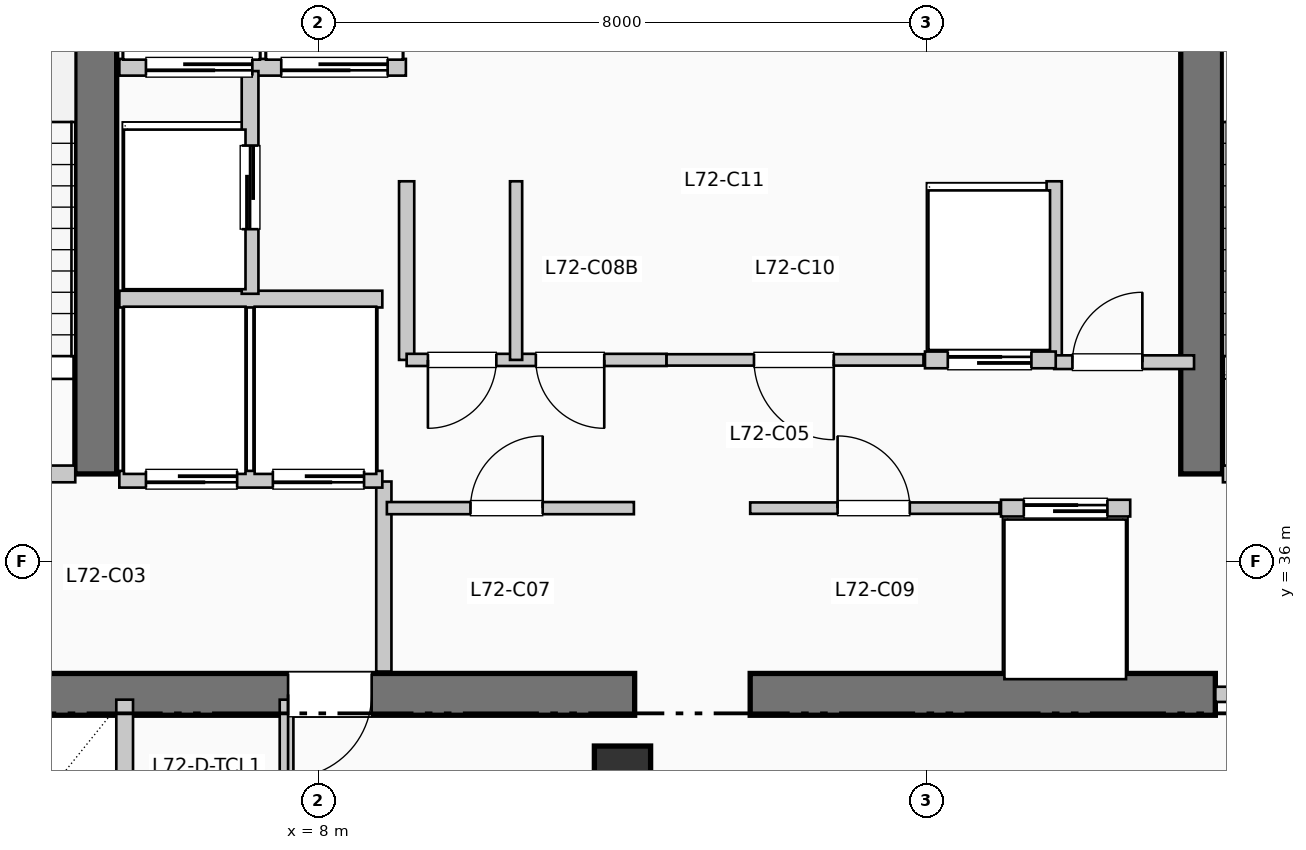
"""IFC4 building model, lengths in metres.
Left out: names, types, materials, properties, quantities, classifications, styles, units other than length and angle.
Written with IfcOpenShell. Run it as: python <this file> out.ifc"""

import sys

from ifc_helpers import new_model, si_unit, direction, frame, frame_2d, origin, origin_2d, place, context, subcontext, project, spatial, rectangle, extrude, element, fill, save


model = new_model("IFC4")
c1 = context("Model", 3, precision=1e-05, world=origin(), true_north=direction((0.0, 1.0)))
c2 = subcontext(c1, "Body", "Model", "MODEL_VIEW")
j1 = project(units=[si_unit("LENGTHUNIT", "METRE"), si_unit("PLANEANGLEUNIT", "RADIAN")], contexts=[c1])
p1 = place(None, origin())
s1 = spatial("IfcSite", under=j1, at=p1, CompositionType="ELEMENT")
p2 = place(p1, origin())
s2 = spatial("IfcBuilding", under=s1, at=p2, CompositionType="ELEMENT")
p3 = place(p2, frame((0.0, 0.0, 296.01)))
s3 = spatial("IfcBuildingStorey", under=s2, at=p3, CompositionType="ELEMENT", Elevation=296.01)
p4 = place(p3, frame((1.45, 34.25, 0.0), z_axis=(0.0, 0.0, 1.0), x_axis=(1.0, 0.0, 0.0)))
e1 = element("IfcWall", 1, at=p4, inside=s3, PredefinedType="SHEAR", context=c2, shape_type="SweptSolid", body=[
    extrude(rectangle(XDim=10.71, YDim=0.55, at=frame_2d((5.355, 0.0))), origin(), (0.0, 0.0, 1.0), 3.96),
])
p5 = place(p4, frame((7.25, 0.0, 0.0), z_axis=(0.0, 0.0, 1.0), x_axis=(-1.0, 0.0, 0.0)))
e2 = element("IfcOpeningElement", 2, at=p5, cuts=e1, PredefinedType="OPENING", context=c2, shape_type="SweptSolid", body=[
    extrude(rectangle(XDim=1.1, YDim=2.15, at=frame_2d((0.55, 1.075))), frame((0.0, 0.285, 0.0), z_axis=(0.0, -1.0, 0.0), x_axis=(1.0, 0.0, 0.0)), (0.0, 0.0, 1.0), 0.57),
])
p6 = place(p3, frame((13.68, 34.25, 0.0), z_axis=(0.0, 0.0, 1.0), x_axis=(1.0, 0.0, 0.0)))
e3 = element("IfcWall", 3, at=p6, inside=s3, PredefinedType="SHEAR", context=c2, shape_type="SweptSolid", body=[
    extrude(rectangle(XDim=6.12, YDim=0.55, at=frame_2d((3.06, 0.0))), origin(), (0.0, 0.0, 1.0), 3.96),
])
for number, where, z_axis, x_axis in (
    (4, (5.07, 37.15, 0.0), (0.0, 0.0, 1.0), (0.0, 1.0, 0.0)),
    (5, (19.62, 37.15, 0.0), (0.0, 0.0, 1.0), (0.0, 1.0, 0.0)),
):
    element("IfcWall", number, at=place(p3, frame(where, z_axis=z_axis, x_axis=x_axis)), inside=s3, PredefinedType="SHEAR", context=c2, shape_type="SweptSolid", body=[
        extrude(rectangle(XDim=7.89, YDim=0.55, at=frame_2d((3.945, 0.0))), origin(), (0.0, 0.0, 1.0), 3.96),
    ])
p7 = place(p3, frame((12.0, 33.2, 0.0), z_axis=(0.0, 0.0, 1.0), x_axis=(1.0, 0.0, 0.0)))
e6 = element("IfcColumn", 6, at=p7, inside=s3, PredefinedType="COLUMN", context=c2, shape_type="SweptSolid", body=[
    extrude(rectangle(XDim=0.74, YDim=0.74, at=origin_2d()), origin(), (0.0, 0.0, 1.0), 3.96),
])
p8 = place(p3, frame((1.65, 37.15, 0.0), z_axis=(0.0, 0.0, 1.0), x_axis=(1.0, 0.0, 0.0)))
e7 = element("IfcWall", 7, at=p8, inside=s3, PredefinedType="PARTITIONING", context=c2, shape_type="SweptSolid", body=[
    extrude(rectangle(XDim=3.15, YDim=0.22, at=frame_2d((1.575, 0.0))), origin(), (0.0, 0.0, 1.0), 3.74),
])
p9 = place(p8, frame((2.05, 0.0, 0.0), z_axis=(0.0, 0.0, 1.0), x_axis=(-1.0, 0.0, 0.0)))
e8 = element("IfcOpeningElement", 8, at=p9, cuts=e7, PredefinedType="OPENING", context=c2, shape_type="SweptSolid", body=[
    extrude(rectangle(XDim=1.05, YDim=2.15, at=frame_2d((0.525, 1.075))), frame((0.0, 0.12, 0.0), z_axis=(0.0, -1.0, 0.0), x_axis=(1.0, 0.0, 0.0)), (0.0, 0.0, 1.0), 0.24),
])
p10 = place(p3, frame((8.86, 34.55, 0.0), z_axis=(0.0, 0.0, 1.0), x_axis=(0.0, 1.0, 0.0)))
e9 = element("IfcWall", 9, at=p10, inside=s3, PredefinedType="PARTITIONING", context=c2, shape_type="SweptSolid", body=[
    extrude(rectangle(XDim=2.5, YDim=0.2, at=frame_2d((1.25, 0.0))), origin(), (0.0, 0.0, 1.0), 3.74),
])
p11 = place(p3, frame((19.9, 37.15, 0.0), z_axis=(0.0, 0.0, 1.0), x_axis=(1.0, 0.0, 0.0)))
e10 = element("IfcWall", 10, at=p11, inside=s3, PredefinedType="PARTITIONING", context=c2, shape_type="SweptSolid", body=[
    extrude(rectangle(XDim=3.15, YDim=0.22, at=frame_2d((1.575, 0.0))), origin(), (0.0, 0.0, 1.0), 3.74),
])
p12 = place(p11, frame((2.05, 0.0, 0.0), z_axis=(0.0, 0.0, 1.0), x_axis=(-1.0, 0.0, 0.0)))
e11 = element("IfcOpeningElement", 11, at=p12, cuts=e10, PredefinedType="OPENING", context=c2, shape_type="SweptSolid", body=[
    extrude(rectangle(XDim=1.05, YDim=2.15, at=frame_2d((0.525, 1.075))), frame((0.0, 0.12, 0.0), z_axis=(0.0, -1.0, 0.0), x_axis=(1.0, 0.0, 0.0)), (0.0, 0.0, 1.0), 0.24),
])
p13 = place(p3, frame((19.8, 34.25, 0.0), z_axis=(0.0, 0.0, 1.0), x_axis=(1.0, 0.0, 0.0)))
e12 = element("IfcWall", 12, at=p13, inside=s3, PredefinedType="PARTITIONING", context=c2, shape_type="SweptSolid", body=[
    extrude(rectangle(XDim=3.25, YDim=0.2, at=frame_2d((1.625, 0.0))), origin(), (0.0, 0.0, 1.0), 3.74),
])
p14 = place(p13, frame((2.15, 0.0, 0.0), z_axis=(0.0, 0.0, 1.0), x_axis=(-1.0, 0.0, 0.0)))
e13 = element("IfcOpeningElement", 13, at=p14, cuts=e12, PredefinedType="OPENING", context=c2, shape_type="SweptSolid", body=[
    extrude(rectangle(XDim=1.1, YDim=2.15, at=frame_2d((0.55, 1.075))), frame((0.0, 0.11, 0.0), z_axis=(0.0, -1.0, 0.0), x_axis=(1.0, 0.0, 0.0)), (0.0, 0.0, 1.0), 0.22),
])
p15 = place(p3, frame((5.38, 37.08, 0.0), z_axis=(0.0, 0.0, 1.0), x_axis=(1.0, 0.0, 0.0)))
e14 = element("IfcWall", 14, at=p15, inside=s3, PredefinedType="PARTITIONING", context=c2, shape_type="SweptSolid", body=[
    extrude(rectangle(XDim=3.46, YDim=0.22, at=frame_2d((1.73, 0.0))), origin(), (0.0, 0.0, 1.0), 3.74),
])
p16 = place(p15, frame((1.55, 0.0, 0.0), z_axis=(0.0, 0.0, 1.0), x_axis=(-1.0, 0.0, 0.0)))
e15 = element("IfcOpeningElement", 15, at=p16, cuts=e14, PredefinedType="OPENING", context=c2, shape_type="SweptSolid", body=[
    extrude(rectangle(XDim=1.2, YDim=2.2, at=frame_2d((0.6, 1.1))), frame((0.0, 0.12, 0.0), z_axis=(0.0, -1.0, 0.0), x_axis=(1.0, 0.0, 0.0)), (0.0, 0.0, 1.0), 0.24),
])
p17 = place(p15, frame((3.22, 0.0, 0.0), z_axis=(0.0, 0.0, 1.0), x_axis=(-1.0, 0.0, 0.0)))
e16 = element("IfcOpeningElement", 16, at=p17, cuts=e14, PredefinedType="OPENING", context=c2, shape_type="SweptSolid", body=[
    extrude(rectangle(XDim=1.2, YDim=2.2, at=frame_2d((0.6, 1.1))), frame((0.0, 0.12, 0.0), z_axis=(0.0, -1.0, 0.0), x_axis=(1.0, 0.0, 0.0)), (0.0, 0.0, 1.0), 0.24),
])
p18 = place(p3, frame((5.38, 39.45, 0.0), z_axis=(0.0, 0.0, 1.0), x_axis=(1.0, 0.0, 0.0)))
e17 = element("IfcWall", 17, at=p18, inside=s3, PredefinedType="PARTITIONING", context=c2, shape_type="SweptSolid", body=[
    extrude(rectangle(XDim=3.46, YDim=0.22, at=frame_2d((1.73, 0.0))), origin(), (0.0, 0.0, 1.0), 3.74),
])
p19 = place(p3, frame((5.38, 42.5, 0.0), z_axis=(0.0, 0.0, 1.0), x_axis=(1.0, 0.0, 0.0)))
e18 = element("IfcWall", 18, at=p19, inside=s3, PredefinedType="PARTITIONING", context=c2, shape_type="SweptSolid", body=[
    extrude(rectangle(XDim=3.77, YDim=0.22, at=frame_2d((1.885, 0.0))), origin(), (0.0, 0.0, 1.0), 3.74),
])
p20 = place(p19, frame((1.75, 0.0, 0.0), z_axis=(0.0, 0.0, 1.0), x_axis=(-1.0, 0.0, 0.0)))
e19 = element("IfcOpeningElement", 19, at=p20, cuts=e18, PredefinedType="OPENING", context=c2, shape_type="SweptSolid", body=[
    extrude(rectangle(XDim=1.4, YDim=2.2, at=frame_2d((0.7, 1.1))), frame((0.0, 0.12, 0.0), z_axis=(0.0, -1.0, 0.0), x_axis=(1.0, 0.0, 0.0)), (0.0, 0.0, 1.0), 0.24),
])
p21 = place(p19, frame((3.53, 0.0, 0.0), z_axis=(0.0, 0.0, 1.0), x_axis=(-1.0, 0.0, 0.0)))
e20 = element("IfcOpeningElement", 20, at=p21, cuts=e18, PredefinedType="OPENING", context=c2, shape_type="SweptSolid", body=[
    extrude(rectangle(XDim=1.4, YDim=2.2, at=frame_2d((0.7, 1.1))), frame((0.0, 0.12, 0.0), z_axis=(0.0, -1.0, 0.0), x_axis=(1.0, 0.0, 0.0)), (0.0, 0.0, 1.0), 0.24),
])
p22 = place(p3, frame((7.1, 39.52, 0.0), z_axis=(0.0, 0.0, 1.0), x_axis=(0.0, 1.0, 0.0)))
e21 = element("IfcWall", 21, at=p22, inside=s3, PredefinedType="PARTITIONING", context=c2, shape_type="SweptSolid", body=[
    extrude(rectangle(XDim=2.93, YDim=0.22, at=frame_2d((1.465, 0.0))), origin(), (0.0, 0.0, 1.0), 3.74),
])
p23 = place(p22, frame((0.85, 0.0, 0.0)))
e22 = element("IfcOpeningElement", 22, at=p23, cuts=e21, PredefinedType="OPENING", context=c2, shape_type="SweptSolid", body=[
    extrude(rectangle(XDim=1.1, YDim=2.2, at=frame_2d((0.55, 1.1))), frame((0.0, 0.12, 0.0), z_axis=(0.0, -1.0, 0.0), x_axis=(1.0, 0.0, 0.0)), (0.0, 0.0, 1.0), 0.24),
])
p24 = place(p3, frame((5.45, 31.8, 0.0), z_axis=(0.0, 0.0, 1.0), x_axis=(0.0, 1.0, 0.0)))
e23 = element("IfcWall", 23, at=p24, inside=s3, PredefinedType="PARTITIONING", context=c2, shape_type="SweptSolid", body=[
    extrude(rectangle(XDim=2.38, YDim=0.22, at=frame_2d((1.19, 0.0))), origin(), (0.0, 0.0, 1.0), 3.74),
])
for number, where, z_axis, x_axis in (
    (24, (9.16, 38.65, 0.0), (0.0, 0.0, 1.0), (0.0, 1.0, 0.0)),
    (25, (17.68, 38.65, 0.0), (0.0, 0.0, 1.0), (0.0, 1.0, 0.0)),
):
    element("IfcWall", number, at=place(p3, frame(where, z_axis=z_axis, x_axis=x_axis)), inside=s3, PredefinedType="PARTITIONING", context=c2, shape_type="SweptSolid", body=[
        extrude(rectangle(XDim=2.35, YDim=0.2, at=frame_2d((1.175, 0.0))), origin(), (0.0, 0.0, 1.0), 3.74),
    ])
p25 = place(p3, frame((17.68, 38.62, 0.0), z_axis=(0.0, 0.0, 1.0), x_axis=(1.0, 0.0, 0.0)))
e26 = element("IfcWall", 26, at=p25, inside=s3, PredefinedType="PARTITIONING", context=c2, shape_type="SweptSolid", body=[
    extrude(rectangle(XDim=1.84, YDim=0.18, at=frame_2d((0.92, 0.0))), origin(), (0.0, 0.0, 1.0), 3.74),
])
p26 = place(p25, frame((0.24, 0.0, 0.0)))
e27 = element("IfcOpeningElement", 27, at=p26, cuts=e26, PredefinedType="OPENING", context=c2, shape_type="SweptSolid", body=[
    extrude(rectangle(XDim=0.92, YDim=2.1, at=frame_2d((0.46, 1.05))), frame((0.0, 0.1, 0.0), z_axis=(0.0, -1.0, 0.0), x_axis=(1.0, 0.0, 0.0)), (0.0, 0.0, 1.0), 0.2),
])
p27 = place(p3, frame((7.58, 31.82, 0.0), z_axis=(0.0, 0.0, 1.0), x_axis=(0.0, 1.0, 0.0)))
e28 = element("IfcWall", 28, at=p27, inside=s3, PredefinedType="PLUMBINGWALL", context=c2, shape_type="SweptSolid", body=[
    extrude(rectangle(XDim=2.36, YDim=0.18, at=frame_2d((1.18, 0.0))), origin(), (0.0, 0.0, 1.0), 3.74),
])
p28 = place(p3, frame((8.9, 36.7, 0.0), z_axis=(0.0, 0.0, 1.0), x_axis=(1.0, 0.0, 0.0)))
e29 = element("IfcWall", 29, at=p28, inside=s3, PredefinedType="PARTITIONING", context=c2, shape_type="SweptSolid", body=[
    extrude(rectangle(XDim=3.25, YDim=0.16, at=frame_2d((1.625, 0.0))), origin(), (0.0, 0.0, 1.0), 3.74),
])
p29 = place(p28, frame((1.1, 0.0, 0.0)))
e30 = element("IfcOpeningElement", 30, at=p29, cuts=e29, PredefinedType="OPENING", context=c2, shape_type="SweptSolid", body=[
    extrude(rectangle(XDim=0.95, YDim=2.15, at=frame_2d((0.475, 1.075))), frame((0.0, 0.09, 0.0), z_axis=(0.0, -1.0, 0.0), x_axis=(1.0, 0.0, 0.0)), (0.0, 0.0, 1.0), 0.18),
])
p30 = place(p3, frame((9.16, 38.65, 0.0), z_axis=(0.0, 0.0, 1.0), x_axis=(1.0, 0.0, 0.0)))
e31 = element("IfcWall", 31, at=p30, inside=s3, PredefinedType="PARTITIONING", context=c2, shape_type="SweptSolid", body=[
    extrude(rectangle(XDim=3.42, YDim=0.16, at=frame_2d((1.71, 0.0))), origin(), (0.0, 0.0, 1.0), 3.74),
])
p31 = place(p30, frame((1.18, 0.0, 0.0), z_axis=(0.0, 0.0, 1.0), x_axis=(-1.0, 0.0, 0.0)))
e32 = element("IfcOpeningElement", 32, at=p31, cuts=e31, PredefinedType="OPENING", context=c2, shape_type="SweptSolid", body=[
    extrude(rectangle(XDim=0.9, YDim=2.15, at=frame_2d((0.45, 1.075))), frame((0.0, 0.09, 0.0), z_axis=(0.0, -1.0, 0.0), x_axis=(1.0, 0.0, 0.0)), (0.0, 0.0, 1.0), 0.18),
])
p32 = place(p30, frame((2.6, 0.0, 0.0), z_axis=(0.0, 0.0, 1.0), x_axis=(-1.0, 0.0, 0.0)))
e33 = element("IfcOpeningElement", 33, at=p32, cuts=e31, PredefinedType="OPENING", context=c2, shape_type="SweptSolid", body=[
    extrude(rectangle(XDim=0.9, YDim=2.15, at=frame_2d((0.45, 1.075))), frame((0.0, 0.09, 0.0), z_axis=(0.0, -1.0, 0.0), x_axis=(1.0, 0.0, 0.0)), (0.0, 0.0, 1.0), 0.18),
])
p33 = place(p3, frame((10.6, 38.65, 0.0), z_axis=(0.0, 0.0, 1.0), x_axis=(0.0, 1.0, 0.0)))
e34 = element("IfcWall", 34, at=p33, inside=s3, PredefinedType="PARTITIONING", context=c2, shape_type="SweptSolid", body=[
    extrude(rectangle(XDim=2.35, YDim=0.16, at=frame_2d((1.175, 0.0))), origin(), (0.0, 0.0, 1.0), 3.74),
])
p34 = place(p3, frame((13.68, 36.7, 0.0), z_axis=(0.0, 0.0, 1.0), x_axis=(1.0, 0.0, 0.0)))
e35 = element("IfcWall", 35, at=p34, inside=s3, PredefinedType="PARTITIONING", context=c2, shape_type="SweptSolid", body=[
    extrude(rectangle(XDim=3.28, YDim=0.15, at=frame_2d((1.64, 0.0))), origin(), (0.0, 0.0, 1.0), 3.74),
])
p35 = place(p34, frame((1.15, 0.0, 0.0)))
e36 = element("IfcOpeningElement", 36, at=p35, cuts=e35, PredefinedType="OPENING", context=c2, shape_type="SweptSolid", body=[
    extrude(rectangle(XDim=0.95, YDim=2.15, at=frame_2d((0.475, 1.075))), frame((0.0, 0.085, 0.0), z_axis=(0.0, -1.0, 0.0), x_axis=(1.0, 0.0, 0.0)), (0.0, 0.0, 1.0), 0.17),
])
p36 = place(p3, frame((12.58, 38.65, 0.0), z_axis=(0.0, 0.0, 1.0), x_axis=(1.0, 0.0, 0.0)))
e37 = element("IfcWall", 37, at=p36, inside=s3, PredefinedType="PARTITIONING", context=c2, shape_type="SweptSolid", body=[
    extrude(rectangle(XDim=3.38, YDim=0.15, at=frame_2d((1.69, 0.0))), origin(), (0.0, 0.0, 1.0), 3.74),
])
p37 = place(p36, frame((2.2, 0.0, 0.0), z_axis=(0.0, 0.0, 1.0), x_axis=(-1.0, 0.0, 0.0)))
e38 = element("IfcOpeningElement", 38, at=p37, cuts=e37, PredefinedType="OPENING", context=c2, shape_type="SweptSolid", body=[
    extrude(rectangle(XDim=1.05, YDim=2.15, at=frame_2d((0.525, 1.075))), frame((0.0, 0.085, 0.0), z_axis=(0.0, -1.0, 0.0), x_axis=(1.0, 0.0, 0.0)), (0.0, 0.0, 1.0), 0.17),
])
p38 = place(p3, frame((16.98, 36.7, 0.0), z_axis=(0.0, 0.0, 1.0), x_axis=(1.0, 0.0, 0.0)))
e39 = element("IfcWall", 39, at=p38, inside=s3, PredefinedType="PARTITIONING", context=c2, shape_type="SweptSolid", body=[
    extrude(rectangle(XDim=1.7, YDim=0.22, at=frame_2d((0.85, 0.0))), origin(), (0.0, 0.0, 1.0), 3.74),
])
p39 = place(p38, frame((0.3, 0.0, 0.0)))
e40 = element("IfcOpeningElement", 40, at=p39, cuts=e39, PredefinedType="OPENING", context=c2, shape_type="SweptSolid", body=[
    extrude(rectangle(XDim=1.1, YDim=2.2, at=frame_2d((0.55, 1.1))), frame((0.0, 0.12, 0.0), z_axis=(0.0, -1.0, 0.0), x_axis=(1.0, 0.0, 0.0)), (0.0, 0.0, 1.0), 0.24),
])
p40 = place(p3, frame((15.98, 38.65, 0.0), z_axis=(0.0, 0.0, 1.0), x_axis=(1.0, 0.0, 0.0)))
e41 = element("IfcWall", 41, at=p40, inside=s3, PredefinedType="PARTITIONING", context=c2, shape_type="SweptSolid", body=[
    extrude(rectangle(XDim=1.72, YDim=0.22, at=frame_2d((0.86, 0.0))), origin(), (0.0, 0.0, 1.0), 3.74),
])
p41 = place(p40, frame((0.3, 0.0, 0.0)))
e42 = element("IfcOpeningElement", 42, at=p41, cuts=e41, PredefinedType="OPENING", context=c2, shape_type="SweptSolid", body=[
    extrude(rectangle(XDim=1.1, YDim=2.2, at=frame_2d((0.55, 1.1))), frame((0.0, 0.12, 0.0), z_axis=(0.0, -1.0, 0.0), x_axis=(1.0, 0.0, 0.0)), (0.0, 0.0, 1.0), 0.24),
])
p42 = place(p5, origin())
e43 = element("IfcDoor", 43, at=p42, inside=s3, OperationType="SINGLE_SWING_LEFT", PredefinedType="DOOR", context=c2, shape_type="SweptSolid", body=[
    extrude(rectangle(XDim=1.1, YDim=2.15, at=frame_2d((0.55, 1.075))), frame((0.0, 0.025, 0.0), z_axis=(0.0, -1.0, 0.0), x_axis=(1.0, 0.0, 0.0)), (0.0, 0.0, 1.0), 0.05),
])
fill(e2, e43)
p43 = place(p16, origin())
e44 = element("IfcDoor", 44, at=p43, inside=s3, OperationType="SLIDING_TO_RIGHT", PredefinedType="DOOR", context=c2, shape_type="SweptSolid", body=[
    extrude(rectangle(XDim=1.2, YDim=2.2, at=frame_2d((0.6, 1.1))), frame((0.0, 0.025, 0.0), z_axis=(0.0, -1.0, 0.0), x_axis=(1.0, 0.0, 0.0)), (0.0, 0.0, 1.0), 0.05),
])
fill(e15, e44)
p44 = place(p17, origin())
e45 = element("IfcDoor", 45, at=p44, inside=s3, OperationType="SLIDING_TO_RIGHT", PredefinedType="DOOR", context=c2, shape_type="SweptSolid", body=[
    extrude(rectangle(XDim=1.2, YDim=2.2, at=frame_2d((0.6, 1.1))), frame((0.0, 0.025, 0.0), z_axis=(0.0, -1.0, 0.0), x_axis=(1.0, 0.0, 0.0)), (0.0, 0.0, 1.0), 0.05),
])
fill(e16, e45)
p45 = place(p20, origin())
e46 = element("IfcDoor", 46, at=p45, inside=s3, OperationType="SLIDING_TO_LEFT", PredefinedType="DOOR", context=c2, shape_type="SweptSolid", body=[
    extrude(rectangle(XDim=1.4, YDim=2.2, at=frame_2d((0.7, 1.1))), frame((0.0, 0.025, 0.0), z_axis=(0.0, -1.0, 0.0), x_axis=(1.0, 0.0, 0.0)), (0.0, 0.0, 1.0), 0.05),
])
fill(e19, e46)
p46 = place(p21, origin())
e47 = element("IfcDoor", 47, at=p46, inside=s3, OperationType="SLIDING_TO_LEFT", PredefinedType="DOOR", context=c2, shape_type="SweptSolid", body=[
    extrude(rectangle(XDim=1.4, YDim=2.2, at=frame_2d((0.7, 1.1))), frame((0.0, 0.025, 0.0), z_axis=(0.0, -1.0, 0.0), x_axis=(1.0, 0.0, 0.0)), (0.0, 0.0, 1.0), 0.05),
])
fill(e20, e47)
p47 = place(p23, origin())
e48 = element("IfcDoor", 48, at=p47, inside=s3, OperationType="SLIDING_TO_LEFT", PredefinedType="DOOR", context=c2, shape_type="SweptSolid", body=[
    extrude(rectangle(XDim=1.1, YDim=2.2, at=frame_2d((0.55, 1.1))), frame((0.0, 0.025, 0.0), z_axis=(0.0, -1.0, 0.0), x_axis=(1.0, 0.0, 0.0)), (0.0, 0.0, 1.0), 0.05),
])
fill(e22, e48)
p48 = place(p26, origin())
e49 = element("IfcDoor", 49, at=p48, inside=s3, OperationType="SINGLE_SWING_RIGHT", PredefinedType="DOOR", context=c2, shape_type="SweptSolid", body=[
    extrude(rectangle(XDim=0.92, YDim=2.1, at=frame_2d((0.46, 1.05))), frame((0.0, 0.025, 0.0), z_axis=(0.0, -1.0, 0.0), x_axis=(1.0, 0.0, 0.0)), (0.0, 0.0, 1.0), 0.05),
])
fill(e27, e49)
p49 = place(p29, origin())
e50 = element("IfcDoor", 50, at=p49, inside=s3, OperationType="SINGLE_SWING_RIGHT", PredefinedType="DOOR", context=c2, shape_type="SweptSolid", body=[
    extrude(rectangle(XDim=0.95, YDim=2.15, at=frame_2d((0.475, 1.075))), frame((0.0, 0.025, 0.0), z_axis=(0.0, -1.0, 0.0), x_axis=(1.0, 0.0, 0.0)), (0.0, 0.0, 1.0), 0.05),
])
fill(e30, e50)
p50 = place(p31, origin())
e51 = element("IfcDoor", 51, at=p50, inside=s3, OperationType="SINGLE_SWING_LEFT", PredefinedType="DOOR", context=c2, shape_type="SweptSolid", body=[
    extrude(rectangle(XDim=0.9, YDim=2.15, at=frame_2d((0.45, 1.075))), frame((0.0, 0.025, 0.0), z_axis=(0.0, -1.0, 0.0), x_axis=(1.0, 0.0, 0.0)), (0.0, 0.0, 1.0), 0.05),
])
fill(e32, e51)
p51 = place(p32, origin())
e52 = element("IfcDoor", 52, at=p51, inside=s3, OperationType="SINGLE_SWING_RIGHT", PredefinedType="DOOR", context=c2, shape_type="SweptSolid", body=[
    extrude(rectangle(XDim=0.9, YDim=2.15, at=frame_2d((0.45, 1.075))), frame((0.0, 0.025, 0.0), z_axis=(0.0, -1.0, 0.0), x_axis=(1.0, 0.0, 0.0)), (0.0, 0.0, 1.0), 0.05),
])
fill(e33, e52)
p52 = place(p35, origin())
e53 = element("IfcDoor", 53, at=p52, inside=s3, OperationType="SINGLE_SWING_LEFT", PredefinedType="DOOR", context=c2, shape_type="SweptSolid", body=[
    extrude(rectangle(XDim=0.95, YDim=2.15, at=frame_2d((0.475, 1.075))), frame((0.0, 0.025, 0.0), z_axis=(0.0, -1.0, 0.0), x_axis=(1.0, 0.0, 0.0)), (0.0, 0.0, 1.0), 0.05),
])
fill(e36, e53)
p53 = place(p37, origin())
e54 = element("IfcDoor", 54, at=p53, inside=s3, OperationType="SINGLE_SWING_RIGHT", PredefinedType="DOOR", context=c2, shape_type="SweptSolid", body=[
    extrude(rectangle(XDim=1.05, YDim=2.15, at=frame_2d((0.525, 1.075))), frame((0.0, 0.025, 0.0), z_axis=(0.0, -1.0, 0.0), x_axis=(1.0, 0.0, 0.0)), (0.0, 0.0, 1.0), 0.05),
])
fill(e38, e54)
p54 = place(p39, origin())
e55 = element("IfcDoor", 55, at=p54, inside=s3, OperationType="SLIDING_TO_LEFT", PredefinedType="DOOR", context=c2, shape_type="SweptSolid", body=[
    extrude(rectangle(XDim=1.1, YDim=2.2, at=frame_2d((0.55, 1.1))), frame((0.0, 0.025, 0.0), z_axis=(0.0, -1.0, 0.0), x_axis=(1.0, 0.0, 0.0)), (0.0, 0.0, 1.0), 0.05),
])
fill(e40, e55)
p55 = place(p41, origin())
e56 = element("IfcDoor", 56, at=p55, inside=s3, OperationType="SLIDING_TO_LEFT", PredefinedType="DOOR", context=c2, shape_type="SweptSolid", body=[
    extrude(rectangle(XDim=1.1, YDim=2.2, at=frame_2d((0.55, 1.1))), frame((0.0, 0.025, 0.0), z_axis=(0.0, -1.0, 0.0), x_axis=(1.0, 0.0, 0.0)), (0.0, 0.0, 1.0), 0.05),
])
fill(e42, e56)
save(model, sys.argv[1])
